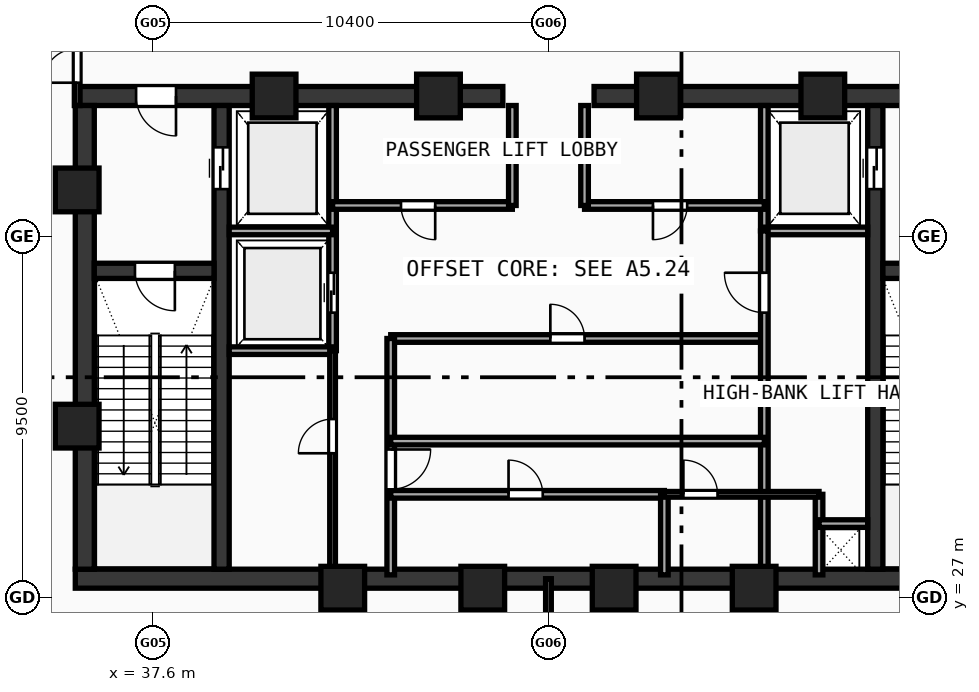
"""IFC4 building model, lengths in metres.
Left out: names, types, materials, properties, quantities, classifications, styles, units other than length and angle.
Written with IfcOpenShell. Run it as: python <this file> out.ifc"""

import sys

from ifc_helpers import new_model, si_unit, direction, frame, frame_2d, origin, origin_with_axes, origin_2d, place, context, subcontext, project, spatial, rectangle, hollow_rectangle, extrude, source, transform, mapped, element, fill, save


model = new_model("IFC4")
c1 = context("Model", 3, precision=1e-05, world=origin(), true_north=direction((0.0, 1.0)))
c2 = subcontext(c1, "Body", "Model", "MODEL_VIEW")
j1 = project(units=[si_unit("LENGTHUNIT", "METRE"), si_unit("PLANEANGLEUNIT", "RADIAN")], contexts=[c1])
p1 = place(None, origin())
s1 = spatial("IfcSite", under=j1, at=p1, CompositionType="ELEMENT")
p2 = place(p1, origin())
s2 = spatial("IfcBuilding", under=s1, at=p2, CompositionType="ELEMENT")
p3 = place(p2, frame((0.0, 0.0, 381.76)))
s3 = spatial("IfcBuildingStorey", under=s2, at=p3, CompositionType="ELEMENT", Elevation=381.76)
p4 = place(p3, frame((35.55, 27.5, 0.0), z_axis=(0.0, 0.0, 1.0), x_axis=(1.0, 0.0, 0.0)))
e1 = element("IfcWall", 1, at=p4, inside=s3, PredefinedType="SHEAR", context=c2, shape_type="SweptSolid", body=[
    extrude(rectangle(XDim=24.9, YDim=0.5, at=frame_2d((12.45, 0.0))), origin(), (0.0, 0.0, 1.0), 4.72),
])
p5 = place(p3, frame((35.55, 40.2, 0.0), z_axis=(0.0, 0.0, 1.0), x_axis=(1.0, 0.0, 0.0)))
e2 = element("IfcWall", 2, at=p5, inside=s3, PredefinedType="SHEAR", context=c2, shape_type="SweptSolid", body=[
    extrude(rectangle(XDim=11.25, YDim=0.5, at=frame_2d((5.625, 0.0))), origin(), (0.0, 0.0, 1.0), 4.72),
])
p6 = place(p5, frame((1.6, 0.0, 0.0)))
e3 = element("IfcOpeningElement", 3, at=p6, cuts=e2, PredefinedType="OPENING", context=c2, shape_type="SweptSolid", body=[
    extrude(rectangle(XDim=1.05, YDim=2.1, at=frame_2d((0.525, 1.05))), frame((0.0, 0.26, 0.0), z_axis=(0.0, -1.0, 0.0), x_axis=(1.0, 0.0, 0.0)), (0.0, 0.0, 1.0), 0.52),
])
p7 = place(p3, frame((49.2, 40.2, 0.0), z_axis=(0.0, 0.0, 1.0), x_axis=(1.0, 0.0, 0.0)))
e4 = element("IfcWall", 4, at=p7, inside=s3, PredefinedType="SHEAR", context=c2, shape_type="SweptSolid", body=[
    extrude(rectangle(XDim=11.25, YDim=0.5, at=frame_2d((5.625, 0.0))), origin(), (0.0, 0.0, 1.0), 4.72),
])
p8 = place(p7, frame((8.6, 0.0, 0.0)))
e5 = element("IfcOpeningElement", 5, at=p8, cuts=e4, PredefinedType="OPENING", context=c2, shape_type="SweptSolid", body=[
    extrude(rectangle(XDim=1.05, YDim=2.1, at=frame_2d((0.525, 1.05))), frame((0.0, 0.26, 0.0), z_axis=(0.0, -1.0, 0.0), x_axis=(1.0, 0.0, 0.0)), (0.0, 0.0, 1.0), 0.52),
])
p9 = place(p3, frame((35.8, 27.75, 0.0), z_axis=(0.0, 0.0, 1.0), x_axis=(0.0, 1.0, 0.0)))
e6 = element("IfcWall", 6, at=p9, inside=s3, PredefinedType="SHEAR", context=c2, shape_type="SweptSolid", body=[
    extrude(rectangle(XDim=12.2, YDim=0.5, at=frame_2d((6.1, 0.0))), origin(), (0.0, 0.0, 1.0), 4.72),
])
p10 = place(p3, frame((39.4, 27.75, 0.0), z_axis=(0.0, 0.0, 1.0), x_axis=(0.0, 1.0, 0.0)))
e7 = element("IfcWall", 7, at=p10, inside=s3, PredefinedType="SHEAR", context=c2, shape_type="SweptSolid", body=[
    extrude(rectangle(XDim=12.2, YDim=0.4, at=frame_2d((6.1, 0.0))), origin(), (0.0, 0.0, 1.0), 4.72),
])
p11 = place(p10, frame((10.0, 0.0, 0.0)))
e8 = element("IfcOpeningElement", 8, at=p11, cuts=e7, PredefinedType="OPENING", context=c2, shape_type="SweptSolid", body=[
    extrude(rectangle(XDim=1.1, YDim=2.1, at=frame_2d((0.55, 1.05))), frame((0.0, 0.21, 0.0), z_axis=(0.0, -1.0, 0.0), x_axis=(1.0, 0.0, 0.0)), (0.0, 0.0, 1.0), 0.42),
])
p12 = place(p3, frame((56.6, 27.75, 0.0), z_axis=(0.0, 0.0, 1.0), x_axis=(0.0, 1.0, 0.0)))
e9 = element("IfcWall", 9, at=p12, inside=s3, PredefinedType="SHEAR", context=c2, shape_type="SweptSolid", body=[
    extrude(rectangle(XDim=12.2, YDim=0.4, at=frame_2d((6.1, 0.0))), origin(), (0.0, 0.0, 1.0), 4.72),
])
p13 = place(p12, frame((10.0, 0.0, 0.0)))
e10 = element("IfcOpeningElement", 10, at=p13, cuts=e9, PredefinedType="OPENING", context=c2, shape_type="SweptSolid", body=[
    extrude(rectangle(XDim=1.1, YDim=2.1, at=frame_2d((0.55, 1.05))), frame((0.0, 0.21, 0.0), z_axis=(0.0, -1.0, 0.0), x_axis=(1.0, 0.0, 0.0)), (0.0, 0.0, 1.0), 0.42),
])
p14 = place(p3, frame((36.05, 35.6, 0.0), z_axis=(0.0, 0.0, 1.0), x_axis=(1.0, 0.0, 0.0)))
e11 = element("IfcWall", 11, at=p14, inside=s3, PredefinedType="SHEAR", context=c2, shape_type="SweptSolid", body=[
    extrude(rectangle(XDim=3.15, YDim=0.4, at=frame_2d((1.575, 0.0))), origin(), (0.0, 0.0, 1.0), 4.72),
])
p15 = place(p14, frame((1.07, 0.0, 0.0)))
e12 = element("IfcOpeningElement", 12, at=p15, cuts=e11, PredefinedType="OPENING", context=c2, shape_type="SweptSolid", body=[
    extrude(rectangle(XDim=1.05, YDim=2.1, at=frame_2d((0.525, 1.05))), frame((0.0, 0.21, 0.0), z_axis=(0.0, -1.0, 0.0), x_axis=(1.0, 0.0, 0.0)), (0.0, 0.0, 1.0), 0.42),
])
p16 = place(p3, frame((56.8, 35.6, 0.0), z_axis=(0.0, 0.0, 1.0), x_axis=(1.0, 0.0, 0.0)))
e13 = element("IfcWall", 13, at=p16, inside=s3, PredefinedType="SHEAR", context=c2, shape_type="SweptSolid", body=[
    extrude(rectangle(XDim=3.15, YDim=0.4, at=frame_2d((1.575, 0.0))), origin(), (0.0, 0.0, 1.0), 4.72),
])
p17 = place(p16, frame((1.02, 0.0, 0.0)))
e14 = element("IfcOpeningElement", 14, at=p17, cuts=e13, PredefinedType="OPENING", context=c2, shape_type="SweptSolid", body=[
    extrude(rectangle(XDim=1.05, YDim=2.1, at=frame_2d((0.525, 1.05))), frame((0.0, 0.21, 0.0), z_axis=(0.0, -1.0, 0.0), x_axis=(1.0, 0.0, 0.0)), (0.0, 0.0, 1.0), 0.42),
])
m1 = source(origin(), c2, "Body", "SweptSolid", [
    extrude(hollow_rectangle(XDim=1.15, YDim=1.15, WallThickness=0.048, at=origin_2d()), origin(), (0.0, 0.0, 1.0), 5.0),
])
for number, where, z_axis, x_axis in (
    (15, (42.588, 27.25, -0.28), (0.0, 0.0, 1.0), (1.0, 0.0, 0.0)),
    (16, (46.272, 27.25, -0.28), (0.0, 0.0, 1.0), (1.0, 0.0, 0.0)),
    (17, (49.729, 27.25, -0.28), (0.0, 0.0, 1.0), (1.0, 0.0, 0.0)),
    (18, (53.412, 27.25, -0.28), (0.0, 0.0, 1.0), (1.0, 0.0, 0.0)),
    (19, (55.219, 40.2, -0.28), (0.0, 0.0, 1.0), (1.0, 0.0, 0.0)),
    (20, (50.894, 40.2, -0.28), (0.0, 0.0, 1.0), (1.0, 0.0, 0.0)),
    (21, (45.106, 40.2, -0.28), (0.0, 0.0, 1.0), (1.0, 0.0, 0.0)),
    (22, (40.781, 40.2, -0.28), (0.0, 0.0, 1.0), (1.0, 0.0, 0.0)),
    (23, (35.6, 37.729, -0.28), (0.0, 0.0, 1.0), (1.0, 0.0, 0.0)),
    (24, (35.6, 31.513, -0.28), (0.0, 0.0, 1.0), (1.0, 0.0, 0.0)),
):
    element("IfcColumn", number, at=place(p3, frame(where, z_axis=z_axis, x_axis=x_axis)), inside=s3, PredefinedType="COLUMN", context=c2, shape_type="MappedRepresentation", body=[
        mapped(m1, transform((0.0, 0.0, 0.0), scale=1.0)),
    ])
p18 = place(p3, frame((42.32, 33.5, 0.0), z_axis=(0.0, 0.0, 1.0), x_axis=(0.0, 1.0, 0.0)))
e25 = element("IfcWall", 25, at=p18, inside=s3, PredefinedType="SOLIDWALL", context=c2, shape_type="SweptSolid", body=[
    extrude(rectangle(XDim=6.45, YDim=0.2, at=frame_2d((3.225, 0.0))), origin(), (0.0, 0.0, 1.0), 4.72),
])
p19 = place(p18, frame((1.0, 0.0, 0.0)))
e26 = element("IfcOpeningElement", 26, at=p19, cuts=e25, PredefinedType="OPENING", context=c2, shape_type="SweptSolid", body=[
    extrude(rectangle(XDim=1.05, YDim=2.1, at=frame_2d((0.525, 1.05))), frame((0.0, 0.11, 0.0), z_axis=(0.0, -1.0, 0.0), x_axis=(1.0, 0.0, 0.0)), (0.0, 0.0, 1.0), 0.22),
])
for number, where, z_axis, x_axis in (
    (27, (39.6, 36.65, 0.0), (0.0, 0.0, 1.0), (1.0, 0.0, 0.0)),
    (28, (39.6, 33.5, 0.0), (0.0, 0.0, 1.0), (1.0, 0.0, 0.0)),
):
    element("IfcWall", number, at=place(p3, frame(where, z_axis=z_axis, x_axis=x_axis)), inside=s3, PredefinedType="SOLIDWALL", context=c2, shape_type="SweptSolid", body=[
        extrude(rectangle(XDim=2.72, YDim=0.2, at=frame_2d((1.36, 0.0))), origin(), (0.0, 0.0, 1.0), 4.72),
    ])
p20 = place(p3, frame((53.68, 36.65, 0.0), z_axis=(0.0, 0.0, 1.0), x_axis=(0.0, 1.0, 0.0)))
e29 = element("IfcWall", 29, at=p20, inside=s3, PredefinedType="SOLIDWALL", context=c2, shape_type="SweptSolid", body=[
    extrude(rectangle(XDim=3.3, YDim=0.2, at=frame_2d((1.65, 0.0))), origin(), (0.0, 0.0, 1.0), 4.72),
])
p21 = place(p3, frame((53.68, 36.65, 0.0), z_axis=(0.0, 0.0, 1.0), x_axis=(1.0, 0.0, 0.0)))
e30 = element("IfcWall", 30, at=p21, inside=s3, PredefinedType="SOLIDWALL", context=c2, shape_type="SweptSolid", body=[
    extrude(rectangle(XDim=2.72, YDim=0.2, at=frame_2d((1.36, 0.0))), origin(), (0.0, 0.0, 1.0), 4.72),
])
p22 = place(p3, frame((42.32, 37.32, 0.0), z_axis=(0.0, 0.0, 1.0), x_axis=(1.0, 0.0, 0.0)))
e31 = element("IfcWall", 31, at=p22, inside=s3, PredefinedType="SOLIDWALL", context=c2, shape_type="SweptSolid", body=[
    extrude(rectangle(XDim=4.73, YDim=0.2, at=frame_2d((2.365, 0.0))), origin(), (0.0, 0.0, 1.0), 4.72),
])
p23 = place(p22, frame((1.8, 0.0, 0.0)))
e32 = element("IfcOpeningElement", 32, at=p23, cuts=e31, PredefinedType="OPENING", context=c2, shape_type="SweptSolid", body=[
    extrude(rectangle(XDim=0.9, YDim=2.1, at=frame_2d((0.45, 1.05))), frame((0.0, 0.11, 0.0), z_axis=(0.0, -1.0, 0.0), x_axis=(1.0, 0.0, 0.0)), (0.0, 0.0, 1.0), 0.22),
])
p24 = place(p3, frame((48.95, 37.32, 0.0), z_axis=(0.0, 0.0, 1.0), x_axis=(1.0, 0.0, 0.0)))
e33 = element("IfcWall", 33, at=p24, inside=s3, PredefinedType="SOLIDWALL", context=c2, shape_type="SweptSolid", body=[
    extrude(rectangle(XDim=4.73, YDim=0.2, at=frame_2d((2.365, 0.0))), origin(), (0.0, 0.0, 1.0), 4.72),
])
p25 = place(p24, frame((1.8, 0.0, 0.0)))
e34 = element("IfcOpeningElement", 34, at=p25, cuts=e33, PredefinedType="OPENING", context=c2, shape_type="SweptSolid", body=[
    extrude(rectangle(XDim=0.9, YDim=2.1, at=frame_2d((0.45, 1.05))), frame((0.0, 0.11, 0.0), z_axis=(0.0, -1.0, 0.0), x_axis=(1.0, 0.0, 0.0)), (0.0, 0.0, 1.0), 0.22),
])
for number, where, z_axis, x_axis in (
    (35, (47.05, 37.32, 0.0), (0.0, 0.0, 1.0), (0.0, 1.0, 0.0)),
    (36, (48.95, 37.32, 0.0), (0.0, 0.0, 1.0), (0.0, 1.0, 0.0)),
):
    element("IfcWall", number, at=place(p3, frame(where, z_axis=z_axis, x_axis=x_axis)), inside=s3, PredefinedType="SOLIDWALL", context=c2, shape_type="SweptSolid", body=[
        extrude(rectangle(XDim=2.63, YDim=0.2, at=frame_2d((1.315, 0.0))), origin(), (0.0, 0.0, 1.0), 4.72),
    ])
p26 = place(p3, frame((43.85, 33.82, 0.0), z_axis=(0.0, 0.0, 1.0), x_axis=(1.0, 0.0, 0.0)))
e37 = element("IfcWall", 37, at=p26, inside=s3, PredefinedType="SOLIDWALL", context=c2, shape_type="SweptSolid", body=[
    extrude(rectangle(XDim=9.83, YDim=0.2, at=frame_2d((4.915, 0.0))), origin(), (0.0, 0.0, 1.0), 4.72),
])
p27 = place(p26, frame((4.2, 0.0, 0.0)))
e38 = element("IfcOpeningElement", 38, at=p27, cuts=e37, PredefinedType="OPENING", context=c2, shape_type="SweptSolid", body=[
    extrude(rectangle(XDim=0.9, YDim=2.1, at=frame_2d((0.45, 1.05))), frame((0.0, 0.11, 0.0), z_axis=(0.0, -1.0, 0.0), x_axis=(1.0, 0.0, 0.0)), (0.0, 0.0, 1.0), 0.22),
])
p28 = place(p3, frame((43.85, 27.6, 0.0), z_axis=(0.0, 0.0, 1.0), x_axis=(0.0, 1.0, 0.0)))
e39 = element("IfcWall", 39, at=p28, inside=s3, PredefinedType="SOLIDWALL", context=c2, shape_type="SweptSolid", body=[
    extrude(rectangle(XDim=6.22, YDim=0.2, at=frame_2d((3.11, 0.0))), origin(), (0.0, 0.0, 1.0), 4.72),
])
p29 = place(p28, frame((2.25, 0.0, 0.0)))
e40 = element("IfcOpeningElement", 40, at=p29, cuts=e39, PredefinedType="OPENING", context=c2, shape_type="SweptSolid", body=[
    extrude(rectangle(XDim=1.05, YDim=2.1, at=frame_2d((0.525, 1.05))), frame((0.0, 0.11, 0.0), z_axis=(0.0, -1.0, 0.0), x_axis=(1.0, 0.0, 0.0)), (0.0, 0.0, 1.0), 0.22),
])
p30 = place(p3, frame((53.68, 27.6, 0.0), z_axis=(0.0, 0.0, 1.0), x_axis=(0.0, 1.0, 0.0)))
e41 = element("IfcWall", 41, at=p30, inside=s3, PredefinedType="SOLIDWALL", context=c2, shape_type="SweptSolid", body=[
    extrude(rectangle(XDim=9.05, YDim=0.2, at=frame_2d((4.525, 0.0))), origin(), (0.0, 0.0, 1.0), 4.72),
])
p31 = place(p30, frame((6.9, 0.0, 0.0)))
e42 = element("IfcOpeningElement", 42, at=p31, cuts=e41, PredefinedType="OPENING", context=c2, shape_type="SweptSolid", body=[
    extrude(rectangle(XDim=1.05, YDim=2.1, at=frame_2d((0.525, 1.05))), frame((0.0, 0.11, 0.0), z_axis=(0.0, -1.0, 0.0), x_axis=(1.0, 0.0, 0.0)), (0.0, 0.0, 1.0), 0.22),
])
p32 = place(p3, frame((43.85, 29.72, 0.0), z_axis=(0.0, 0.0, 1.0), x_axis=(1.0, 0.0, 0.0)))
e43 = element("IfcWall", 43, at=p32, inside=s3, PredefinedType="SOLIDWALL", context=c2, shape_type="SweptSolid", body=[
    extrude(rectangle(XDim=7.2, YDim=0.2, at=frame_2d((3.6, 0.0))), origin(), (0.0, 0.0, 1.0), 4.72),
])
p33 = place(p32, frame((3.1, 0.0, 0.0)))
e44 = element("IfcOpeningElement", 44, at=p33, cuts=e43, PredefinedType="OPENING", context=c2, shape_type="SweptSolid", body=[
    extrude(rectangle(XDim=0.9, YDim=2.1, at=frame_2d((0.45, 1.05))), frame((0.0, 0.11, 0.0), z_axis=(0.0, -1.0, 0.0), x_axis=(1.0, 0.0, 0.0)), (0.0, 0.0, 1.0), 0.22),
])
p34 = place(p3, frame((51.05, 27.6, 0.0), z_axis=(0.0, 0.0, 1.0), x_axis=(0.0, 1.0, 0.0)))
e45 = element("IfcWall", 45, at=p34, inside=s3, PredefinedType="SOLIDWALL", context=c2, shape_type="SweptSolid", body=[
    extrude(rectangle(XDim=2.12, YDim=0.2, at=frame_2d((1.06, 0.0))), origin(), (0.0, 0.0, 1.0), 4.72),
])
p35 = place(p3, frame((43.85, 31.12, 0.0), z_axis=(0.0, 0.0, 1.0), x_axis=(1.0, 0.0, 0.0)))
e46 = element("IfcWall", 46, at=p35, inside=s3, PredefinedType="SOLIDWALL", context=c2, shape_type="SweptSolid", body=[
    extrude(rectangle(XDim=9.83, YDim=0.2, at=frame_2d((4.915, 0.0))), origin(), (0.0, 0.0, 1.0), 4.72),
])
p36 = place(p3, frame((55.12, 27.6, 0.0), z_axis=(0.0, 0.0, 1.0), x_axis=(0.0, 1.0, 0.0)))
e47 = element("IfcWall", 47, at=p36, inside=s3, PredefinedType="SOLIDWALL", context=c2, shape_type="SweptSolid", body=[
    extrude(rectangle(XDim=2.12, YDim=0.2, at=frame_2d((1.06, 0.0))), origin(), (0.0, 0.0, 1.0), 4.72),
])
p37 = place(p3, frame((55.12, 28.95, 0.0), z_axis=(0.0, 0.0, 1.0), x_axis=(1.0, 0.0, 0.0)))
e48 = element("IfcWall", 48, at=p37, inside=s3, PredefinedType="SOLIDWALL", context=c2, shape_type="SweptSolid", body=[
    extrude(rectangle(XDim=1.28, YDim=0.2, at=frame_2d((0.64, 0.0))), origin(), (0.0, 0.0, 1.0), 4.72),
])
p38 = place(p3, frame((42.32, 27.6, 0.0), z_axis=(0.0, 0.0, 1.0), x_axis=(0.0, 1.0, 0.0)))
e49 = element("IfcWall", 49, at=p38, inside=s3, PredefinedType="PARTITIONING", context=c2, shape_type="SweptSolid", body=[
    extrude(rectangle(XDim=5.9, YDim=0.15, at=frame_2d((2.95, 0.0))), origin(), (0.0, 0.0, 1.0), 4.72),
])
p39 = place(p38, frame((3.2, 0.0, 0.0)))
e50 = element("IfcOpeningElement", 50, at=p39, cuts=e49, PredefinedType="OPENING", context=c2, shape_type="SweptSolid", body=[
    extrude(rectangle(XDim=0.9, YDim=2.1, at=frame_2d((0.45, 1.05))), frame((0.0, 0.085, 0.0), z_axis=(0.0, -1.0, 0.0), x_axis=(1.0, 0.0, 0.0)), (0.0, 0.0, 1.0), 0.17),
])
p40 = place(p3, frame((51.05, 29.72, 0.0), z_axis=(0.0, 0.0, 1.0), x_axis=(1.0, 0.0, 0.0)))
e51 = element("IfcWall", 51, at=p40, inside=s3, PredefinedType="PARTITIONING", context=c2, shape_type="SweptSolid", body=[
    extrude(rectangle(XDim=4.07, YDim=0.15, at=frame_2d((2.035, 0.0))), origin(), (0.0, 0.0, 1.0), 4.72),
])
p41 = place(p40, frame((0.5, 0.0, 0.0)))
e52 = element("IfcOpeningElement", 52, at=p41, cuts=e51, PredefinedType="OPENING", context=c2, shape_type="SweptSolid", body=[
    extrude(rectangle(XDim=0.9, YDim=2.1, at=frame_2d((0.45, 1.05))), frame((0.0, 0.085, 0.0), z_axis=(0.0, -1.0, 0.0), x_axis=(1.0, 0.0, 0.0)), (0.0, 0.0, 1.0), 0.17),
])
p42 = place(p3, frame((35.6, 39.95, 0.0), z_axis=(0.0, 0.0, 1.0), x_axis=(0.0, 1.0, 0.0)))
e53 = element("IfcWall", 53, at=p42, inside=s3, PredefinedType="PARTITIONING", context=c2, shape_type="SweptSolid", body=[
    extrude(rectangle(XDim=2.17, YDim=0.15, at=frame_2d((1.085, 0.0))), origin(), (0.0, 0.0, 1.0), 4.37),
])
p43 = place(p42, frame((0.6, 0.0, 0.0)))
e54 = element("IfcOpeningElement", 54, at=p43, cuts=e53, PredefinedType="OPENING", context=c2, shape_type="SweptSolid", body=[
    extrude(rectangle(XDim=0.9, YDim=2.1, at=frame_2d((0.45, 1.05))), frame((0.0, 0.085, 0.0), z_axis=(0.0, -1.0, 0.0), x_axis=(1.0, 0.0, 0.0)), (0.0, 0.0, 1.0), 0.17),
])
p44 = place(p3, frame((48.0, 23.314, 0.0), z_axis=(0.0, 0.0, 1.0), x_axis=(0.0, 1.0, 0.0)))
e55 = element("IfcWall", 55, at=p44, inside=s3, PredefinedType="PARTITIONING", context=c2, shape_type="SweptSolid", body=[
    extrude(rectangle(XDim=4.186, YDim=0.15, at=frame_2d((2.093, 0.0))), origin(), (0.0, 0.0, 1.0), 4.12),
])
m2 = source(origin(), c2, "Body", "SweptSolid", [
    extrude(rectangle(XDim=1.05, YDim=2.1, at=frame_2d((0.525, 1.05))), frame((0.0, 0.025, 0.0), z_axis=(0.0, -1.0, 0.0), x_axis=(1.0, 0.0, 0.0)), (0.0, 0.0, 1.0), 0.05),
])
p45 = place(p15, frame((1.05, 0.0, 0.0), z_axis=(0.0, 0.0, 1.0), x_axis=(-1.0, 0.0, 0.0)))
e56 = element("IfcDoor", 56, at=p45, inside=s3, OperationType="SINGLE_SWING_LEFT", PredefinedType="DOOR", context=c2, shape_type="MappedRepresentation", body=[
    mapped(m2, transform((0.0, 0.0, 0.0), scale=1.0)),
])
fill(e12, e56)
p46 = place(p6, frame((1.05, 0.0, 0.0), z_axis=(0.0, 0.0, 1.0), x_axis=(-1.0, 0.0, 0.0)))
e57 = element("IfcDoor", 57, at=p46, inside=s3, OperationType="SINGLE_SWING_LEFT", PredefinedType="DOOR", context=c2, shape_type="MappedRepresentation", body=[
    mapped(m2, transform((0.0, 0.0, 0.0), scale=1.0)),
])
fill(e3, e57)
m3 = source(origin(), c2, "Body", "SweptSolid", [
    extrude(rectangle(XDim=1.1, YDim=2.1, at=frame_2d((0.55, 1.05))), frame((0.0, 0.025, 0.0), z_axis=(0.0, -1.0, 0.0), x_axis=(1.0, 0.0, 0.0)), (0.0, 0.0, 1.0), 0.05),
])
p47 = place(p11, frame((1.1, 0.0, 0.0), z_axis=(0.0, 0.0, 1.0), x_axis=(-1.0, 0.0, 0.0)))
e58 = element("IfcDoor", 58, at=p47, inside=s3, OperationType="DOUBLE_DOOR_SLIDING", PredefinedType="DOOR", context=c2, shape_type="MappedRepresentation", body=[
    mapped(m3, transform((0.0, 0.0, 0.0), scale=1.0)),
])
fill(e8, e58)
p48 = place(p13, origin_with_axes())
e59 = element("IfcDoor", 59, at=p48, inside=s3, OperationType="DOUBLE_DOOR_SLIDING", PredefinedType="DOOR", context=c2, shape_type="MappedRepresentation", body=[
    mapped(m3, transform((0.0, 0.0, 0.0), scale=1.0)),
])
fill(e10, e59)
p49 = place(p19, origin_with_axes())
e60 = element("IfcDoor", 60, at=p49, inside=s3, OperationType="DOUBLE_DOOR_SLIDING", PredefinedType="DOOR", context=c2, shape_type="MappedRepresentation", body=[
    mapped(m2, transform((0.0, 0.0, 0.0), scale=1.0)),
])
fill(e26, e60)
m4 = source(origin(), c2, "Body", "SweptSolid", [
    extrude(rectangle(XDim=0.9, YDim=2.1, at=frame_2d((0.45, 1.05))), frame((0.0, 0.025, 0.0), z_axis=(0.0, -1.0, 0.0), x_axis=(1.0, 0.0, 0.0)), (0.0, 0.0, 1.0), 0.05),
])
p50 = place(p23, frame((0.9, 0.0, 0.0), z_axis=(0.0, 0.0, 1.0), x_axis=(-1.0, 0.0, 0.0)))
e61 = element("IfcDoor", 61, at=p50, inside=s3, OperationType="SINGLE_SWING_LEFT", PredefinedType="DOOR", context=c2, shape_type="MappedRepresentation", body=[
    mapped(m4, transform((0.0, 0.0, 0.0), scale=1.0)),
])
fill(e32, e61)
p51 = place(p25, frame((0.9, 0.0, 0.0), z_axis=(0.0, 0.0, 1.0), x_axis=(-1.0, 0.0, 0.0)))
e62 = element("IfcDoor", 62, at=p51, inside=s3, OperationType="SINGLE_SWING_RIGHT", PredefinedType="DOOR", context=c2, shape_type="MappedRepresentation", body=[
    mapped(m4, transform((0.0, 0.0, 0.0), scale=1.0)),
])
fill(e34, e62)
p52 = place(p27, origin_with_axes())
e63 = element("IfcDoor", 63, at=p52, inside=s3, OperationType="SINGLE_SWING_LEFT", PredefinedType="DOOR", context=c2, shape_type="MappedRepresentation", body=[
    mapped(m4, transform((0.0, 0.0, 0.0), scale=1.0)),
])
fill(e38, e63)
p53 = place(p29, frame((1.05, 0.0, 0.0), z_axis=(0.0, 0.0, 1.0), x_axis=(-1.0, 0.0, 0.0)))
e64 = element("IfcDoor", 64, at=p53, inside=s3, OperationType="SINGLE_SWING_LEFT", PredefinedType="DOOR", context=c2, shape_type="MappedRepresentation", body=[
    mapped(m2, transform((0.0, 0.0, 0.0), scale=1.0)),
])
fill(e40, e64)
p54 = place(p31, origin_with_axes())
e65 = element("IfcDoor", 65, at=p54, inside=s3, OperationType="SINGLE_SWING_RIGHT", PredefinedType="DOOR", context=c2, shape_type="MappedRepresentation", body=[
    mapped(m2, transform((0.0, 0.0, 0.0), scale=1.0)),
])
fill(e42, e65)
p55 = place(p33, origin_with_axes())
e66 = element("IfcDoor", 66, at=p55, inside=s3, OperationType="SINGLE_SWING_LEFT", PredefinedType="DOOR", context=c2, shape_type="MappedRepresentation", body=[
    mapped(m4, transform((0.0, 0.0, 0.0), scale=1.0)),
])
fill(e44, e66)
p56 = place(p39, origin_with_axes())
e67 = element("IfcDoor", 67, at=p56, inside=s3, OperationType="SINGLE_SWING_LEFT", PredefinedType="DOOR", context=c2, shape_type="MappedRepresentation", body=[
    mapped(m4, transform((0.0, 0.0, 0.0), scale=1.0)),
])
fill(e50, e67)
p57 = place(p41, origin_with_axes())
e68 = element("IfcDoor", 68, at=p57, inside=s3, OperationType="SINGLE_SWING_LEFT", PredefinedType="DOOR", context=c2, shape_type="MappedRepresentation", body=[
    mapped(m4, transform((0.0, 0.0, 0.0), scale=1.0)),
])
fill(e52, e68)
p58 = place(p43, origin_with_axes())
e69 = element("IfcDoor", 69, at=p58, inside=s3, OperationType="SINGLE_SWING_LEFT", PredefinedType="DOOR", context=c2, shape_type="MappedRepresentation", body=[
    mapped(m4, transform((0.0, 0.0, 0.0), scale=1.0)),
])
fill(e54, e69)
save(model, sys.argv[1])
